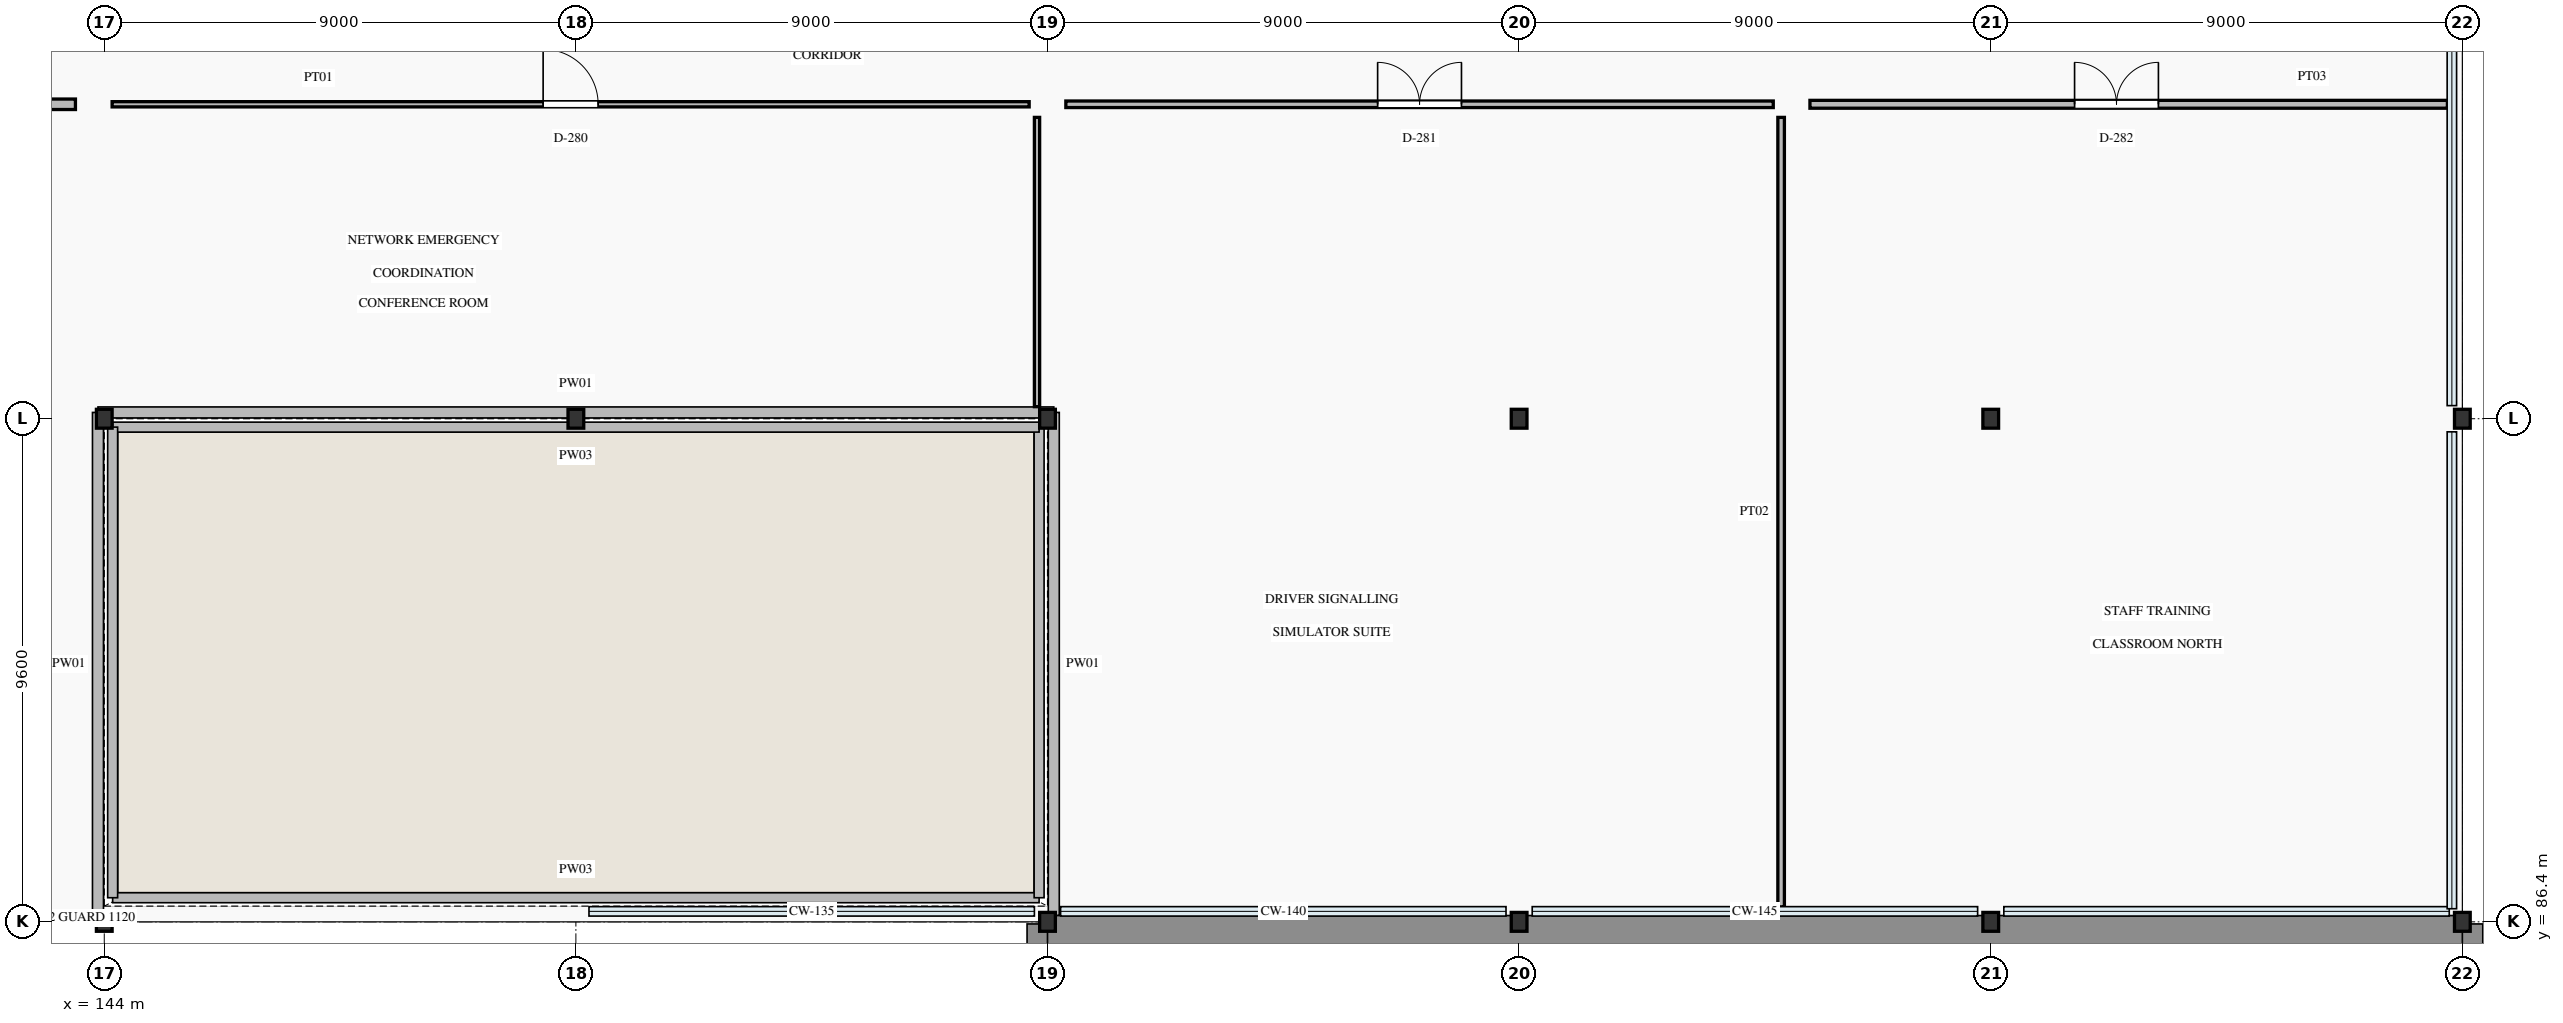
"""IFC4 building model, lengths in metres.
Left out: names, types, materials, properties, quantities, classifications, styles, units other than length and angle.
Written with IfcOpenShell. Run it as: python <this file> out.ifc"""

import sys

from ifc_helpers import new_model, si_unit, direction, frame, frame_2d, origin, origin_2d, place, context, subcontext, project, spatial, rectangle, i_section, extrude, element, fill, save


model = new_model("IFC4")
c1 = context("Model", 3, precision=1e-05, world=origin(), true_north=direction((0.0, 1.0)))
c2 = subcontext(c1, "Body", "Model", "MODEL_VIEW")
j1 = project(units=[si_unit("LENGTHUNIT", "METRE"), si_unit("PLANEANGLEUNIT", "RADIAN")], contexts=[c1])
p1 = place(None, origin())
s1 = spatial("IfcSite", under=j1, at=p1, CompositionType="ELEMENT")
p2 = place(p1, origin())
s2 = spatial("IfcBuilding", under=s1, at=p2, CompositionType="ELEMENT")
p3 = place(p2, frame((0.0, 0.0, 18.9)))
s3 = spatial("IfcBuildingStorey", under=s2, at=p3, CompositionType="ELEMENT", Elevation=18.9)
for number, where, z_axis, x_axis in (
    (1, (144.0, 86.4, 0.0), (0.0, 0.0, 1.0), (1.0, 0.0, 0.0)),
    (2, (144.0, 96.0, 0.0), (0.0, 0.0, 1.0), (1.0, 0.0, 0.0)),
    (3, (153.0, 96.0, 0.0), (0.0, 0.0, 1.0), (1.0, 0.0, 0.0)),
    (4, (162.0, 86.4, 0.0), (0.0, 0.0, 1.0), (1.0, 0.0, 0.0)),
    (5, (162.0, 96.0, 0.0), (0.0, 0.0, 1.0), (1.0, 0.0, 0.0)),
    (6, (171.0, 86.4, 0.0), (0.0, 0.0, 1.0), (1.0, 0.0, 0.0)),
    (7, (171.0, 96.0, 0.0), (0.0, 0.0, 1.0), (1.0, 0.0, 0.0)),
    (8, (180.0, 86.4, 0.0), (0.0, 0.0, 1.0), (1.0, 0.0, 0.0)),
    (9, (180.0, 96.0, 0.0), (0.0, 0.0, 1.0), (1.0, 0.0, 0.0)),
    (10, (189.0, 86.4, 0.0), (0.0, 0.0, 1.0), (1.0, 0.0, 0.0)),
    (11, (189.0, 96.0, 0.0), (0.0, 0.0, 1.0), (1.0, 0.0, 0.0)),
):
    element("IfcColumn", number, at=place(p3, frame(where, z_axis=z_axis, x_axis=x_axis)), inside=s3, PredefinedType="COLUMN", context=c2, shape_type="SweptSolid", body=[
        extrude(i_section(OverallWidth=0.3, OverallDepth=0.36, WebThickness=0.012, FlangeThickness=0.022, FilletRadius=0.027, at=origin_2d()), origin(), (0.0, 0.0, 1.0), 3.9),
    ])
p4 = place(p3, frame((144.16, 86.86, 0.0), z_axis=(0.0, 0.0, 1.0), x_axis=(1.0, 0.0, 0.0)))
e12 = element("IfcWall", 12, at=p4, inside=s3, PredefinedType="PARAPET", context=c2, shape_type="SweptSolid", body=[
    extrude(rectangle(XDim=17.68, YDim=0.19, at=frame_2d((8.84, 0.0))), origin(), (0.0, 0.0, 1.0), 1.15),
])
p5 = place(p3, frame((161.84, 86.86, 0.0), z_axis=(0.0, 0.0, 1.0), x_axis=(0.0, 1.0, 0.0)))
e13 = element("IfcWall", 13, at=p5, inside=s3, PredefinedType="PARAPET", context=c2, shape_type="SweptSolid", body=[
    extrude(rectangle(XDim=8.98, YDim=0.19, at=frame_2d((4.49, 0.0))), origin(), (0.0, 0.0, 1.0), 1.15),
])
p6 = place(p3, frame((161.84, 95.84, 0.0), z_axis=(0.0, 0.0, 1.0), x_axis=(-1.0, 0.0, 0.0)))
e14 = element("IfcWall", 14, at=p6, inside=s3, PredefinedType="PARAPET", context=c2, shape_type="SweptSolid", body=[
    extrude(rectangle(XDim=17.68, YDim=0.19, at=frame_2d((8.84, 0.0))), origin(), (0.0, 0.0, 1.0), 1.15),
])
p7 = place(p3, frame((144.16, 95.84, 0.0), z_axis=(0.0, 0.0, 1.0), x_axis=(0.0, -1.0, 0.0)))
e15 = element("IfcWall", 15, at=p7, inside=s3, PredefinedType="PARAPET", context=c2, shape_type="SweptSolid", body=[
    extrude(rectangle(XDim=8.98, YDim=0.19, at=frame_2d((4.49, 0.0))), origin(), (0.0, 0.0, 1.0), 1.15),
])
p8 = place(p3, frame((143.88, 86.52, 0.0), z_axis=(0.0, 0.0, 1.0), x_axis=(0.0, 1.0, 0.0)))
e16 = element("IfcWall", 16, at=p8, inside=s3, PredefinedType="PARAPET", context=c2, shape_type="SweptSolid", body=[
    extrude(rectangle(XDim=9.6, YDim=0.21, at=frame_2d((4.8, 0.0))), origin(), (0.0, 0.0, 1.0), 1.2),
])
p9 = place(p3, frame((143.88, 96.12, 0.0), z_axis=(0.0, 0.0, 1.0), x_axis=(1.0, 0.0, 0.0)))
e17 = element("IfcWall", 17, at=p9, inside=s3, PredefinedType="PARAPET", context=c2, shape_type="SweptSolid", body=[
    extrude(rectangle(XDim=18.24, YDim=0.21, at=frame_2d((9.12, 0.0))), origin(), (0.0, 0.0, 1.0), 1.2),
])
p10 = place(p3, frame((162.12, 96.12, 0.0), z_axis=(0.0, 0.0, 1.0), x_axis=(0.0, -1.0, 0.0)))
e18 = element("IfcWall", 18, at=p10, inside=s3, PredefinedType="PARAPET", context=c2, shape_type="SweptSolid", body=[
    extrude(rectangle(XDim=9.6, YDim=0.21, at=frame_2d((4.8, 0.0))), origin(), (0.0, 0.0, 1.0), 1.2),
])
p11 = place(p3, frame((126.55, 102.0, 0.0), z_axis=(0.0, 0.0, 1.0), x_axis=(1.0, 0.0, 0.0)))
e19 = element("IfcWall", 19, at=p11, inside=s3, PredefinedType="PARTITIONING", context=c2, shape_type="SweptSolid", body=[
    extrude(rectangle(XDim=16.9, YDim=0.2, at=frame_2d((8.45, 0.0))), origin(), (0.0, 0.0, 1.0), 3.64),
])
p12 = place(p11, frame((7.65, 0.0, 0.0)))
e20 = element("IfcOpeningElement", 20, at=p12, cuts=e19, PredefinedType="OPENING", context=c2, shape_type="SweptSolid", body=[
    extrude(rectangle(XDim=1.6, YDim=2.25, at=frame_2d((0.8, 1.125))), frame((0.0, 0.115, 0.0), z_axis=(0.0, -1.0, 0.0), x_axis=(1.0, 0.0, 0.0)), (0.0, 0.0, 1.0), 0.23),
])
p13 = place(p3, frame((144.15, 102.0, 0.0), z_axis=(0.0, 0.0, 1.0), x_axis=(1.0, 0.0, 0.0)))
e21 = element("IfcWall", 21, at=p13, inside=s3, PredefinedType="PARTITIONING", context=c2, shape_type="SweptSolid", body=[
    extrude(rectangle(XDim=17.5, YDim=0.1, at=frame_2d((8.75, 0.0))), origin(), (0.0, 0.0, 1.0), 3.64),
])
p14 = place(p13, frame((8.225, 0.0, 0.0)))
e22 = element("IfcOpeningElement", 22, at=p14, cuts=e21, PredefinedType="OPENING", context=c2, shape_type="SweptSolid", body=[
    extrude(rectangle(XDim=1.05, YDim=2.2, at=frame_2d((0.525, 1.1))), frame((0.0, 0.065, 0.0), z_axis=(0.0, -1.0, 0.0), x_axis=(1.0, 0.0, 0.0)), (0.0, 0.0, 1.0), 0.13),
])
p15 = place(p3, frame((162.35, 102.0, 0.0), z_axis=(0.0, 0.0, 1.0), x_axis=(1.0, 0.0, 0.0)))
e23 = element("IfcWall", 23, at=p15, inside=s3, PredefinedType="PARTITIONING", context=c2, shape_type="SweptSolid", body=[
    extrude(rectangle(XDim=13.5, YDim=0.125, at=frame_2d((6.75, 0.0))), origin(), (0.0, 0.0, 1.0), 3.64),
])
p16 = place(p15, frame((5.95, 0.0, 0.0)))
e24 = element("IfcOpeningElement", 24, at=p16, cuts=e23, PredefinedType="OPENING", context=c2, shape_type="SweptSolid", body=[
    extrude(rectangle(XDim=1.6, YDim=2.25, at=frame_2d((0.8, 1.125))), frame((0.0, 0.077, 0.0), z_axis=(0.0, -1.0, 0.0), x_axis=(1.0, 0.0, 0.0)), (0.0, 0.0, 1.0), 0.155),
])
p17 = place(p3, frame((176.55, 102.0, 0.0), z_axis=(0.0, 0.0, 1.0), x_axis=(1.0, 0.0, 0.0)))
e25 = element("IfcWall", 25, at=p17, inside=s3, PredefinedType="PARTITIONING", context=c2, shape_type="SweptSolid", body=[
    extrude(rectangle(XDim=12.165, YDim=0.15, at=frame_2d((6.083, 0.0))), origin(), (0.0, 0.0, 1.0), 3.64),
])
p18 = place(p17, frame((5.05, 0.0, 0.0)))
e26 = element("IfcOpeningElement", 26, at=p18, cuts=e25, PredefinedType="OPENING", context=c2, shape_type="SweptSolid", body=[
    extrude(rectangle(XDim=1.6, YDim=2.25, at=frame_2d((0.8, 1.125))), frame((0.0, 0.09, 0.0), z_axis=(0.0, -1.0, 0.0), x_axis=(1.0, 0.0, 0.0)), (0.0, 0.0, 1.0), 0.18),
])
p19 = place(p3, frame((161.8, 96.23, 0.0), z_axis=(0.0, 0.0, 1.0), x_axis=(0.0, 1.0, 0.0)))
e27 = element("IfcWall", 27, at=p19, inside=s3, PredefinedType="PARTITIONING", context=c2, shape_type="SweptSolid", body=[
    extrude(rectangle(XDim=5.52, YDim=0.1, at=frame_2d((2.76, 0.0))), origin(), (0.0, 0.0, 1.0), 3.035),
])
p20 = place(p3, frame((176.0, 86.685, 0.0), z_axis=(0.0, 0.0, 1.0), x_axis=(0.0, 1.0, 0.0)))
e28 = element("IfcWall", 28, at=p20, inside=s3, PredefinedType="PARTITIONING", context=c2, shape_type="SweptSolid", body=[
    extrude(rectangle(XDim=15.065, YDim=0.125, at=frame_2d((7.532, 0.0))), origin(), (0.0, 0.0, 1.0), 3.64),
])
p21 = place(p14, origin())
e29 = element("IfcDoor", 29, at=p21, inside=s3, OperationType="SINGLE_SWING_LEFT", PredefinedType="DOOR", context=c2, shape_type="SweptSolid", body=[
    extrude(rectangle(XDim=1.05, YDim=2.2, at=frame_2d((0.525, 1.1))), frame((0.0, 0.025, 0.0), z_axis=(0.0, -1.0, 0.0), x_axis=(1.0, 0.0, 0.0)), (0.0, 0.0, 1.0), 0.05),
])
fill(e22, e29)
p22 = place(p16, origin())
e30 = element("IfcDoor", 30, at=p22, inside=s3, OperationType="DOUBLE_DOOR_SINGLE_SWING", PredefinedType="DOOR", context=c2, shape_type="SweptSolid", body=[
    extrude(rectangle(XDim=1.6, YDim=2.25, at=frame_2d((0.8, 1.125))), frame((0.0, 0.025, 0.0), z_axis=(0.0, -1.0, 0.0), x_axis=(1.0, 0.0, 0.0)), (0.0, 0.0, 1.0), 0.05),
])
fill(e24, e30)
p23 = place(p18, origin())
e31 = element("IfcDoor", 31, at=p23, inside=s3, OperationType="DOUBLE_DOOR_SINGLE_SWING", PredefinedType="DOOR", context=c2, shape_type="SweptSolid", body=[
    extrude(rectangle(XDim=1.6, YDim=2.25, at=frame_2d((0.8, 1.125))), frame((0.0, 0.025, 0.0), z_axis=(0.0, -1.0, 0.0), x_axis=(1.0, 0.0, 0.0)), (0.0, 0.0, 1.0), 0.05),
])
fill(e26, e31)
save(model, sys.argv[1])
